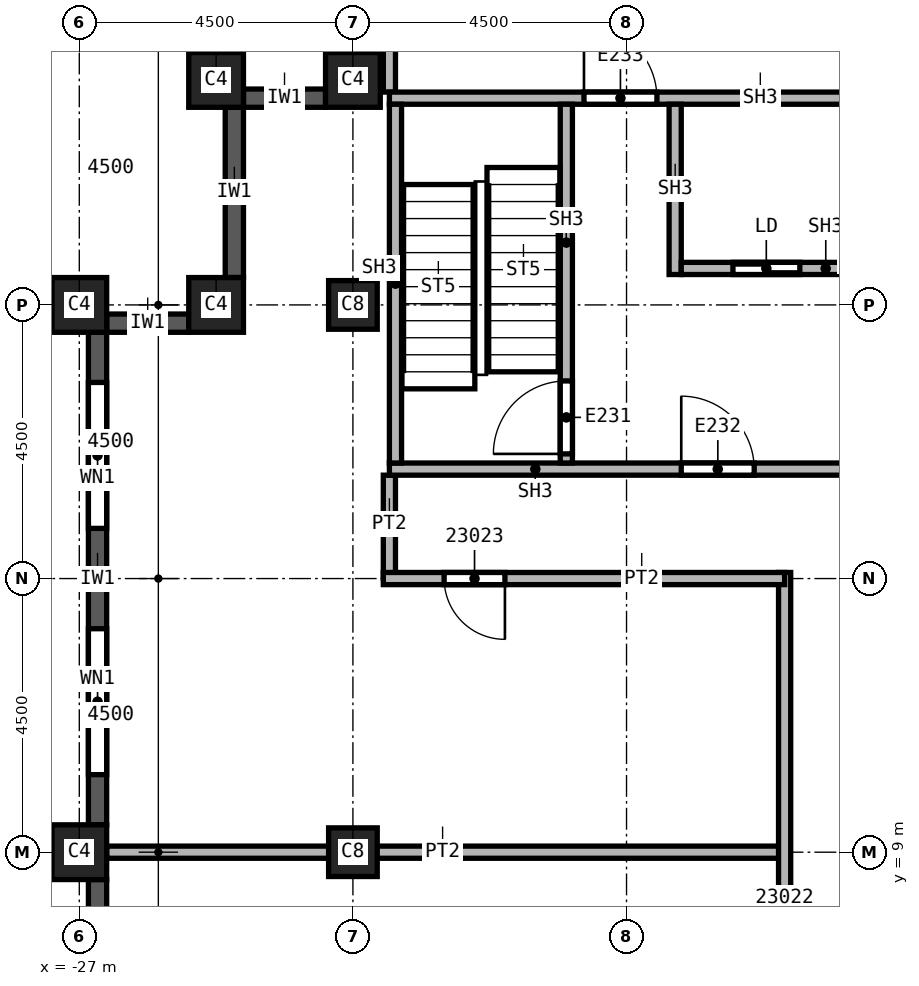
"""IFC4 building model, lengths in metres.
Left out: names, types, materials, properties, quantities, classifications, styles, units other than length and angle.
Written with IfcOpenShell. Run it as: python <this file> out.ifc"""

import sys

from ifc_helpers import new_model, si_unit, direction, frame, frame_2d, origin, origin_2d, place, context, subcontext, project, spatial, rectangle, extrude, element, fill, save


model = new_model("IFC4")
c1 = context("Model", 3, precision=1e-05, world=origin(), true_north=direction((0.0, 1.0)))
c2 = subcontext(c1, "Body", "Model", "MODEL_VIEW")
j1 = project(units=[si_unit("LENGTHUNIT", "METRE"), si_unit("PLANEANGLEUNIT", "RADIAN")], contexts=[c1])
p1 = place(None, origin())
s1 = spatial("IfcSite", under=j1, at=p1, CompositionType="ELEMENT")
p2 = place(p1, origin())
s2 = spatial("IfcBuilding", under=s1, at=p2, CompositionType="ELEMENT")
p3 = place(p2, frame((0.0, 0.0, 326.0)))
s3 = spatial("IfcBuildingStorey", under=s2, at=p3, CompositionType="ELEMENT", Elevation=326.0)
for number, where, z_axis, x_axis in (
    (1, (-22.5, 9.0, 0.0), (0.0, 0.0, 1.0), (1.0, 0.0, 0.0)),
    (2, (-22.5, 18.0, 0.0), (0.0, 0.0, 1.0), (1.0, 0.0, 0.0)),
):
    element("IfcColumn", number, at=place(p3, frame(where, z_axis=z_axis, x_axis=x_axis)), inside=s3, PredefinedType="COLUMN", context=c2, shape_type="SweptSolid", body=[
        extrude(rectangle(XDim=0.8, YDim=0.8, at=origin_2d()), origin(), (0.0, 0.0, 1.0), 3.74),
    ])
for number, where, z_axis, x_axis in (
    (3, (-27.0, 9.0, 0.0), (0.0, 0.0, 1.0), (0.0, 1.0, 0.0)),
    (4, (-27.0, 18.0, 0.0), (0.0, 0.0, 1.0), (0.0, 1.0, 0.0)),
    (5, (-22.5, 21.7, 0.0), (0.0, 0.0, 1.0), (1.0, 0.0, 0.0)),
    (6, (-24.75, 21.7, 0.0), (0.0, 0.0, 1.0), (1.0, 0.0, 0.0)),
    (7, (-24.75, 18.0, 0.0), (0.0, 0.0, 1.0), (1.0, 0.0, 0.0)),
):
    element("IfcColumn", number, at=place(p3, frame(where, z_axis=z_axis, x_axis=x_axis)), inside=s3, PredefinedType="COLUMN", context=c2, shape_type="SweptSolid", body=[
        extrude(rectangle(XDim=0.9, YDim=0.9, at=origin_2d()), origin(), (0.0, 0.0, 1.0), 3.74),
    ])
p4 = place(p3, frame((-24.45, 21.25, 0.0), z_axis=(0.0, 0.0, 1.0), x_axis=(0.0, -1.0, 0.0)))
e8 = element("IfcWall", 8, at=p4, inside=s3, PredefinedType="SOLIDWALL", context=c2, shape_type="SweptSolid", body=[
    extrude(rectangle(XDim=2.8, YDim=0.3, at=frame_2d((1.4, 0.0))), origin(), (0.0, 0.0, 1.0), 3.14),
])
p5 = place(p3, frame((-25.2, 17.7, 0.0), z_axis=(0.0, 0.0, 1.0), x_axis=(-1.0, 0.0, 0.0)))
e9 = element("IfcWall", 9, at=p5, inside=s3, PredefinedType="SOLIDWALL", context=c2, shape_type="SweptSolid", body=[
    extrude(rectangle(XDim=1.35, YDim=0.3, at=frame_2d((0.675, 0.0))), origin(), (0.0, 0.0, 1.0), 3.14),
])
p6 = place(p3, frame((-26.7, 17.55, 0.0), z_axis=(0.0, 0.0, 1.0), x_axis=(0.0, -1.0, 0.0)))
e10 = element("IfcWall", 10, at=p6, inside=s3, PredefinedType="SOLIDWALL", context=c2, shape_type="SweptSolid", body=[
    extrude(rectangle(XDim=8.1, YDim=0.3, at=frame_2d((4.05, 0.0))), origin(), (0.0, 0.0, 1.0), 3.14),
])
p7 = place(p6, frame((0.825, 0.0, 0.8)))
e11 = element("IfcOpeningElement", 11, at=p7, cuts=e10, PredefinedType="OPENING", context=c2, shape_type="SweptSolid", body=[
    extrude(rectangle(XDim=2.4, YDim=1.95, at=frame_2d((1.2, 0.975))), frame((0.0, 0.15, 0.0), z_axis=(0.0, -1.0, 0.0), x_axis=(1.0, 0.0, 0.0)), (0.0, 0.0, 1.0), 0.3),
])
p8 = place(p6, frame((4.875, 0.0, 0.8)))
e12 = element("IfcOpeningElement", 12, at=p8, cuts=e10, PredefinedType="OPENING", context=c2, shape_type="SweptSolid", body=[
    extrude(rectangle(XDim=2.4, YDim=1.95, at=frame_2d((1.2, 0.975))), frame((0.0, 0.15, 0.0), z_axis=(0.0, -1.0, 0.0), x_axis=(1.0, 0.0, 0.0)), (0.0, 0.0, 1.0), 0.3),
])
p9 = place(p3, frame((-26.7, 8.55, 0.0), z_axis=(0.0, 0.0, 1.0), x_axis=(0.0, -1.0, 0.0)))
e13 = element("IfcWall", 13, at=p9, inside=s3, PredefinedType="SOLIDWALL", context=c2, shape_type="SweptSolid", body=[
    extrude(rectangle(XDim=8.1, YDim=0.3, at=frame_2d((4.05, 0.0))), origin(), (0.0, 0.0, 1.0), 3.14),
])
p10 = place(p9, frame((0.825, 0.0, 0.8)))
e14 = element("IfcOpeningElement", 14, at=p10, cuts=e13, PredefinedType="OPENING", context=c2, shape_type="SweptSolid", body=[
    extrude(rectangle(XDim=2.4, YDim=1.95, at=frame_2d((1.2, 0.975))), frame((0.0, 0.15, 0.0), z_axis=(0.0, -1.0, 0.0), x_axis=(1.0, 0.0, 0.0)), (0.0, 0.0, 1.0), 0.3),
])
p11 = place(p9, frame((4.875, 0.0, 0.8)))
e15 = element("IfcOpeningElement", 15, at=p11, cuts=e13, PredefinedType="OPENING", context=c2, shape_type="SweptSolid", body=[
    extrude(rectangle(XDim=2.4, YDim=1.95, at=frame_2d((1.2, 0.975))), frame((0.0, 0.15, 0.0), z_axis=(0.0, -1.0, 0.0), x_axis=(1.0, 0.0, 0.0)), (0.0, 0.0, 1.0), 0.3),
])
p12 = place(p3, frame((-22.95, 21.4, 0.0), z_axis=(0.0, 0.0, 1.0), x_axis=(-1.0, 0.0, 0.0)))
e16 = element("IfcWall", 16, at=p12, inside=s3, PredefinedType="SOLIDWALL", context=c2, shape_type="SweptSolid", body=[
    extrude(rectangle(XDim=1.35, YDim=0.3, at=frame_2d((0.675, 0.0))), origin(), (0.0, 0.0, 1.0), 3.14),
])
p13 = place(p3, frame((-26.55, 9.0, 0.0), z_axis=(0.0, 0.0, 1.0), x_axis=(1.0, 0.0, 0.0)))
e17 = element("IfcWall", 17, at=p13, inside=s3, PredefinedType="PARTITIONING", context=c2, shape_type="SweptSolid", body=[
    extrude(rectangle(XDim=11.15, YDim=0.2, at=frame_2d((5.575, 0.0))), origin(), (0.0, 0.0, 1.0), 3.74),
])
p14 = place(p3, frame((-21.9, 13.5, 0.0), z_axis=(0.0, 0.0, 1.0), x_axis=(0.0, 1.0, 0.0)))
e18 = element("IfcWall", 18, at=p14, inside=s3, PredefinedType="PARTITIONING", context=c2, shape_type="SweptSolid", body=[
    extrude(rectangle(XDim=1.7, YDim=0.2, at=frame_2d((0.85, 0.0))), origin(), (0.0, 0.0, 1.0), 3.74),
])
p15 = place(p3, frame((-21.9, 21.5, 0.0), z_axis=(0.0, 0.0, 1.0), x_axis=(0.0, 1.0, 0.0)))
e19 = element("IfcWall", 19, at=p15, inside=s3, PredefinedType="PARTITIONING", context=c2, shape_type="SweptSolid", body=[
    extrude(rectangle(XDim=3.45, YDim=0.2, at=frame_2d((1.725, 0.0))), origin(), (0.0, 0.0, 1.0), 3.74),
])
p16 = place(p3, frame((-15.4, -24.95, 0.0), z_axis=(0.0, 0.0, 1.0), x_axis=(0.0, 1.0, 0.0)))
e20 = element("IfcWall", 20, at=p16, inside=s3, PredefinedType="PARTITIONING", context=c2, shape_type="SweptSolid", body=[
    extrude(rectangle(XDim=38.55, YDim=0.2, at=frame_2d((19.275, 0.0))), origin(), (0.0, 0.0, 1.0), 3.74),
])
p17 = place(p16, frame((31.7, 0.0, 0.0)))
e21 = element("IfcOpeningElement", 21, at=p17, cuts=e20, PredefinedType="OPENING", context=c2, shape_type="SweptSolid", body=[
    extrude(rectangle(XDim=1.0, YDim=2.1, at=frame_2d((0.5, 1.05))), frame((0.0, 0.1, 0.0), z_axis=(0.0, -1.0, 0.0), x_axis=(1.0, 0.0, 0.0)), (0.0, 0.0, 1.0), 0.2),
])
p18 = place(p16, frame((4.0, 0.0, 0.0)))
e22 = element("IfcOpeningElement", 22, at=p18, cuts=e20, PredefinedType="OPENING", context=c2, shape_type="SweptSolid", body=[
    extrude(rectangle(XDim=1.0, YDim=2.1, at=frame_2d((0.5, 1.05))), frame((0.0, 0.1, 0.0), z_axis=(0.0, -1.0, 0.0), x_axis=(1.0, 0.0, 0.0)), (0.0, 0.0, 1.0), 0.2),
])
p19 = place(p16, frame((11.0, 0.0, 0.0)))
e23 = element("IfcOpeningElement", 23, at=p19, cuts=e20, PredefinedType="OPENING", context=c2, shape_type="SweptSolid", body=[
    extrude(rectangle(XDim=1.0, YDim=2.1, at=frame_2d((0.5, 1.05))), frame((0.0, 0.1, 0.0), z_axis=(0.0, -1.0, 0.0), x_axis=(1.0, 0.0, 0.0)), (0.0, 0.0, 1.0), 0.2),
])
p20 = place(p16, frame((19.1, 0.0, 0.0)))
e24 = element("IfcOpeningElement", 24, at=p20, cuts=e20, PredefinedType="OPENING", context=c2, shape_type="SweptSolid", body=[
    extrude(rectangle(XDim=1.0, YDim=2.1, at=frame_2d((0.5, 1.05))), frame((0.0, 0.1, 0.0), z_axis=(0.0, -1.0, 0.0), x_axis=(1.0, 0.0, 0.0)), (0.0, 0.0, 1.0), 0.2),
])
p21 = place(p3, frame((-15.4, 13.5, 0.0), z_axis=(0.0, 0.0, 1.0), x_axis=(-1.0, 0.0, 0.0)))
e25 = element("IfcWall", 25, at=p21, inside=s3, PredefinedType="PARTITIONING", context=c2, shape_type="SweptSolid", body=[
    extrude(rectangle(XDim=6.6, YDim=0.2, at=frame_2d((3.3, 0.0))), origin(), (0.0, 0.0, 1.0), 3.74),
])
p22 = place(p21, frame((4.6, 0.0, 0.0)))
e26 = element("IfcOpeningElement", 26, at=p22, cuts=e25, PredefinedType="OPENING", context=c2, shape_type="SweptSolid", body=[
    extrude(rectangle(XDim=1.0, YDim=2.1, at=frame_2d((0.5, 1.05))), frame((0.0, 0.1, 0.0), z_axis=(0.0, -1.0, 0.0), x_axis=(1.0, 0.0, 0.0)), (0.0, 0.0, 1.0), 0.2),
])
p23 = place(p3, frame((-21.9, 15.3, 0.0), z_axis=(0.0, 0.0, 1.0), x_axis=(1.0, 0.0, 0.0)))
e27 = element("IfcWall", 27, at=p23, inside=s3, PredefinedType="SOLIDWALL", context=c2, shape_type="SweptSolid", body=[
    extrude(rectangle(XDim=8.275, YDim=0.2, at=frame_2d((4.137, 0.0))), origin(), (0.0, 0.0, 1.0), 3.74),
])
p24 = place(p23, frame((4.8, 0.0, 0.0)))
e28 = element("IfcOpeningElement", 28, at=p24, cuts=e27, PredefinedType="OPENING", context=c2, shape_type="SweptSolid", body=[
    extrude(rectangle(XDim=1.2, YDim=2.1, at=frame_2d((0.6, 1.05))), frame((0.0, 0.1, 0.0), z_axis=(0.0, -1.0, 0.0), x_axis=(1.0, 0.0, 0.0)), (0.0, 0.0, 1.0), 0.2),
])
p25 = place(p3, frame((-21.9, 21.4, 0.0), z_axis=(0.0, 0.0, 1.0), x_axis=(1.0, 0.0, 0.0)))
e29 = element("IfcWall", 29, at=p25, inside=s3, PredefinedType="SOLIDWALL", context=c2, shape_type="SweptSolid", body=[
    extrude(rectangle(XDim=7.8, YDim=0.2, at=frame_2d((3.9, 0.0))), origin(), (0.0, 0.0, 1.0), 3.74),
])
p26 = place(p25, frame((3.2, 0.0, 0.0)))
e30 = element("IfcOpeningElement", 30, at=p26, cuts=e29, PredefinedType="OPENING", context=c2, shape_type="SweptSolid", body=[
    extrude(rectangle(XDim=1.2, YDim=2.1, at=frame_2d((0.6, 1.05))), frame((0.0, 0.1, 0.0), z_axis=(0.0, -1.0, 0.0), x_axis=(1.0, 0.0, 0.0)), (0.0, 0.0, 1.0), 0.2),
])
p27 = place(p3, frame((-21.8, 15.4, 0.0), z_axis=(0.0, 0.0, 1.0), x_axis=(0.0, 1.0, 0.0)))
e31 = element("IfcWall", 31, at=p27, inside=s3, PredefinedType="SOLIDWALL", context=c2, shape_type="SweptSolid", body=[
    extrude(rectangle(XDim=5.9, YDim=0.2, at=frame_2d((2.95, 0.0))), origin(), (0.0, 0.0, 1.0), 3.74),
])
p28 = place(p3, frame((-18.99, 15.4, 0.0), z_axis=(0.0, 0.0, 1.0), x_axis=(0.0, 1.0, 0.0)))
e32 = element("IfcWall", 32, at=p28, inside=s3, PredefinedType="SOLIDWALL", context=c2, shape_type="SweptSolid", body=[
    extrude(rectangle(XDim=5.9, YDim=0.2, at=frame_2d((2.95, 0.0))), origin(), (0.0, 0.0, 1.0), 3.74),
])
p29 = place(p28, frame((0.15, 0.0, 0.0)))
e33 = element("IfcOpeningElement", 33, at=p29, cuts=e32, PredefinedType="OPENING", context=c2, shape_type="SweptSolid", body=[
    extrude(rectangle(XDim=1.2, YDim=2.1, at=frame_2d((0.6, 1.05))), frame((0.0, 0.1, 0.0), z_axis=(0.0, -1.0, 0.0), x_axis=(1.0, 0.0, 0.0)), (0.0, 0.0, 1.0), 0.2),
])
p30 = place(p3, frame((-17.2, 18.5, 0.0), z_axis=(0.0, 0.0, 1.0), x_axis=(0.0, 1.0, 0.0)))
e34 = element("IfcWall", 34, at=p30, inside=s3, PredefinedType="SOLIDWALL", context=c2, shape_type="SweptSolid", body=[
    extrude(rectangle(XDim=2.8, YDim=0.2, at=frame_2d((1.4, 0.0))), origin(), (0.0, 0.0, 1.0), 3.74),
])
p31 = place(p3, frame((-17.1, 18.6, 0.0), z_axis=(0.0, 0.0, 1.0), x_axis=(1.0, 0.0, 0.0)))
e35 = element("IfcWall", 35, at=p31, inside=s3, PredefinedType="SOLIDWALL", context=c2, shape_type="SweptSolid", body=[
    extrude(rectangle(XDim=2.8, YDim=0.2, at=frame_2d((1.4, 0.0))), origin(), (0.0, 0.0, 1.0), 3.74),
])
p32 = place(p31, frame((0.85, 0.0, 0.0)))
e36 = element("IfcOpeningElement", 36, at=p32, cuts=e35, PredefinedType="OPENING", context=c2, shape_type="SweptSolid", body=[
    extrude(rectangle(XDim=1.1, YDim=2.1, at=frame_2d((0.55, 1.05))), frame((0.0, 0.1, 0.0), z_axis=(0.0, -1.0, 0.0), x_axis=(1.0, 0.0, 0.0)), (0.0, 0.0, 1.0), 0.2),
])
p33 = place(p7, origin())
e37 = element("IfcWindow", 37, at=p33, inside=s3, PartitioningType="SINGLE_PANEL", PredefinedType="WINDOW", context=c2, shape_type="SweptSolid", body=[
    extrude(rectangle(XDim=2.4, YDim=1.95, at=frame_2d((1.2, 0.975))), frame((0.0, 0.03, 0.0), z_axis=(0.0, -1.0, 0.0), x_axis=(1.0, 0.0, 0.0)), (0.0, 0.0, 1.0), 0.06),
])
fill(e11, e37)
p34 = place(p8, origin())
e38 = element("IfcWindow", 38, at=p34, inside=s3, PartitioningType="SINGLE_PANEL", PredefinedType="WINDOW", context=c2, shape_type="SweptSolid", body=[
    extrude(rectangle(XDim=2.4, YDim=1.95, at=frame_2d((1.2, 0.975))), frame((0.0, 0.03, 0.0), z_axis=(0.0, -1.0, 0.0), x_axis=(1.0, 0.0, 0.0)), (0.0, 0.0, 1.0), 0.06),
])
fill(e12, e38)
p35 = place(p22, origin())
e39 = element("IfcDoor", 39, at=p35, inside=s3, OperationType="SINGLE_SWING_RIGHT", PredefinedType="DOOR", context=c2, shape_type="SweptSolid", body=[
    extrude(rectangle(XDim=1.0, YDim=2.1, at=frame_2d((0.5, 1.05))), frame((0.0, 0.025, 0.0), z_axis=(0.0, -1.0, 0.0), x_axis=(1.0, 0.0, 0.0)), (0.0, 0.0, 1.0), 0.05),
])
fill(e26, e39)
p36 = place(p29, origin())
e40 = element("IfcDoor", 40, at=p36, inside=s3, OperationType="SINGLE_SWING_LEFT", PredefinedType="DOOR", context=c2, shape_type="SweptSolid", body=[
    extrude(rectangle(XDim=1.2, YDim=2.1, at=frame_2d((0.6, 1.05))), frame((0.0, 0.025, 0.0), z_axis=(0.0, -1.0, 0.0), x_axis=(1.0, 0.0, 0.0)), (0.0, 0.0, 1.0), 0.05),
])
fill(e33, e40)
p37 = place(p32, origin())
e41 = element("IfcDoor", 41, at=p37, inside=s3, OperationType="SLIDING_TO_LEFT", PredefinedType="DOOR", context=c2, shape_type="SweptSolid", body=[
    extrude(rectangle(XDim=1.1, YDim=2.1, at=frame_2d((0.55, 1.05))), frame((0.0, 0.025, 0.0), z_axis=(0.0, -1.0, 0.0), x_axis=(1.0, 0.0, 0.0)), (0.0, 0.0, 1.0), 0.05),
])
fill(e36, e41)
p38 = place(p24, origin())
e42 = element("IfcDoor", 42, at=p38, inside=s3, OperationType="SINGLE_SWING_RIGHT", PredefinedType="DOOR", context=c2, shape_type="SweptSolid", body=[
    extrude(rectangle(XDim=1.2, YDim=2.1, at=frame_2d((0.6, 1.05))), frame((0.0, 0.025, 0.0), z_axis=(0.0, -1.0, 0.0), x_axis=(1.0, 0.0, 0.0)), (0.0, 0.0, 1.0), 0.05),
])
fill(e28, e42)
p39 = place(p26, origin())
e43 = element("IfcDoor", 43, at=p39, inside=s3, OperationType="SINGLE_SWING_LEFT", PredefinedType="DOOR", context=c2, shape_type="SweptSolid", body=[
    extrude(rectangle(XDim=1.2, YDim=2.1, at=frame_2d((0.6, 1.05))), frame((0.0, 0.025, 0.0), z_axis=(0.0, -1.0, 0.0), x_axis=(1.0, 0.0, 0.0)), (0.0, 0.0, 1.0), 0.05),
])
fill(e30, e43)
save(model, sys.argv[1])
